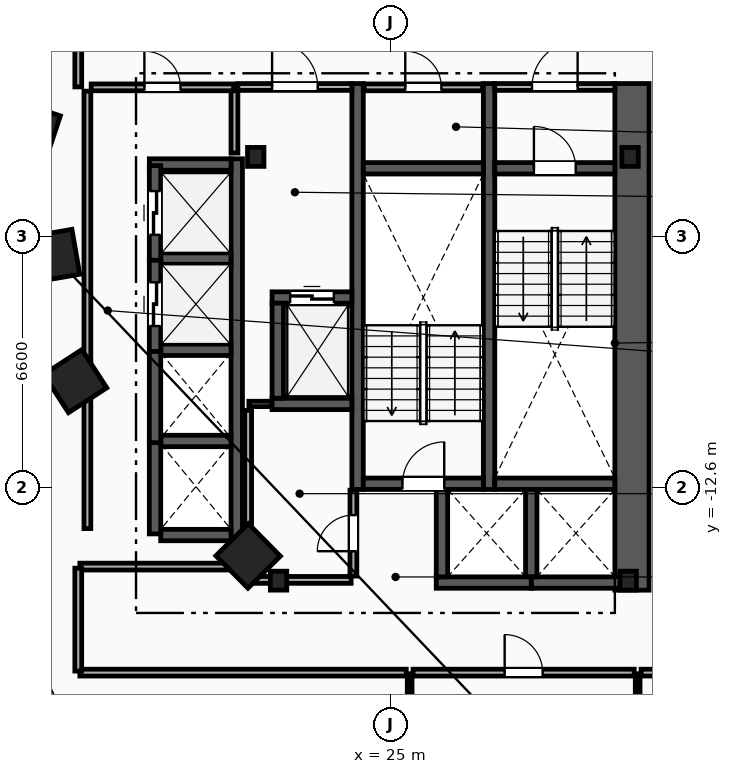
"""IFC4 building model, lengths in metres.
Left out: names, types, materials, properties, quantities, classifications, styles, units other than length and angle.
Written with IfcOpenShell. Run it as: python <this file> out.ifc"""

import sys

from ifc_helpers import new_model, si_unit, direction, frame, frame_2d, origin, origin_2d, place, context, subcontext, project, spatial, rectangle, i_section, extrude, element, fill, save


model = new_model("IFC4")
c1 = context("Model", 3, precision=1e-05, world=origin(), true_north=direction((0.0, 1.0)))
c2 = subcontext(c1, "Body", "Model", "MODEL_VIEW")
j1 = project(units=[si_unit("LENGTHUNIT", "METRE"), si_unit("PLANEANGLEUNIT", "RADIAN")], contexts=[c1])
p1 = place(None, origin())
s1 = spatial("IfcSite", under=j1, at=p1, CompositionType="ELEMENT")
p2 = place(p1, origin())
s2 = spatial("IfcBuilding", under=s1, at=p2, CompositionType="ELEMENT")
p3 = place(p2, frame((0.0, 0.0, 69.6)))
s3 = spatial("IfcBuildingStorey", under=s2, at=p3, CompositionType="ELEMENT", Elevation=69.6)
for number, where, z_axis, x_axis in (
    (1, (31.3, -3.9, 0.0), (0.0, 0.0, 1.0), (1.0, 0.0, 0.0)),
    (2, (21.45, -3.9, 0.0), (0.0, 0.0, 1.0), (1.0, 0.0, 0.0)),
    (3, (22.05, -15.05, 0.0), (0.0, 0.0, 1.0), (1.0, 0.0, 0.0)),
    (4, (31.25, -15.05, 0.0), (0.0, 0.0, 1.0), (1.0, 0.0, 0.0)),
):
    element("IfcColumn", number, at=place(p3, frame(where, z_axis=z_axis, x_axis=x_axis)), inside=s3, PredefinedType="COLUMN", context=c2, shape_type="SweptSolid", body=[
        extrude(i_section(OverallWidth=0.432, OverallDepth=0.498, WebThickness=0.056, FlangeThickness=0.089, FilletRadius=0.018, at=origin_2d()), origin(), (0.0, 0.0, 1.0), 3.8),
    ])
for number, where, z_axis, x_axis in (
    (5, (15.55, -3.2, 0.0), (0.0, 0.0, 1.0), (-0.315, -0.949, 0.0)),
    (6, (16.125, -6.5, 0.0), (0.0, 0.0, 1.0), (0.172, -0.985, 0.0)),
    (7, (16.7, -9.8, 0.0), (0.0, 0.0, 1.0), (0.544, -0.839, 0.0)),
    (8, (21.25, -14.4, 0.0), (0.0, 0.0, 1.0), (0.703, -0.711, 0.0)),
):
    element("IfcColumn", number, at=place(p3, frame(where, z_axis=z_axis, x_axis=x_axis)), inside=s3, PredefinedType="COLUMN", context=c2, shape_type="SweptSolid", body=[
        extrude(rectangle(XDim=1.2, YDim=1.2, at=origin_2d()), origin(), (0.0, 0.0, 1.0), 3.8),
    ])
p4 = place(p3, frame((31.35, -15.3, 0.0), z_axis=(0.0, 0.0, 1.0), x_axis=(0.0, 1.0, 0.0)))
e9 = element("IfcWall", 9, at=p4, inside=s3, PredefinedType="SHEAR", context=c2, shape_type="SweptSolid", body=[
    extrude(rectangle(XDim=13.33, YDim=0.9, at=frame_2d((6.665, 0.0))), origin(), (0.0, 0.0, 1.0), 3.5),
])
for number, where, z_axis, x_axis in (
    (10, (27.59, -12.65, 0.0), (0.0, 0.0, 1.0), (0.0, 1.0, 0.0)),
    (11, (24.13, -12.65, 0.0), (0.0, 0.0, 1.0), (0.0, 1.0, 0.0)),
):
    element("IfcWall", number, at=place(p3, frame(where, z_axis=z_axis, x_axis=x_axis)), inside=s3, PredefinedType="SHEAR", context=c2, shape_type="SweptSolid", body=[
        extrude(rectangle(XDim=10.68, YDim=0.3, at=frame_2d((5.34, 0.0))), origin(), (0.0, 0.0, 1.0), 3.5),
    ])
p5 = place(p3, frame((27.74, -4.2, 0.0), z_axis=(0.0, 0.0, 1.0), x_axis=(1.0, 0.0, 0.0)))
e12 = element("IfcWall", 12, at=p5, inside=s3, PredefinedType="SHEAR", context=c2, shape_type="SweptSolid", body=[
    extrude(rectangle(XDim=3.16, YDim=0.3, at=frame_2d((1.58, 0.0))), origin(), (0.0, 0.0, 1.0), 3.5),
])
p6 = place(p5, frame((1.03, 0.0, 0.0)))
e13 = element("IfcOpeningElement", 13, at=p6, cuts=e12, PredefinedType="OPENING", context=c2, shape_type="SweptSolid", body=[
    extrude(rectangle(XDim=1.1, YDim=2.15, at=frame_2d((0.55, 1.075))), frame((0.0, 0.16, 0.0), z_axis=(0.0, -1.0, 0.0), x_axis=(1.0, 0.0, 0.0)), (0.0, 0.0, 1.0), 0.32),
])
p7 = place(p3, frame((27.74, -12.5, 0.0), z_axis=(0.0, 0.0, 1.0), x_axis=(1.0, 0.0, 0.0)))
e14 = element("IfcWall", 14, at=p7, inside=s3, PredefinedType="SHEAR", context=c2, shape_type="SweptSolid", body=[
    extrude(rectangle(XDim=3.16, YDim=0.3, at=frame_2d((1.58, 0.0))), origin(), (0.0, 0.0, 1.0), 3.5),
])
p8 = place(p3, frame((24.28, -12.5, 0.0), z_axis=(0.0, 0.0, 1.0), x_axis=(1.0, 0.0, 0.0)))
e15 = element("IfcWall", 15, at=p8, inside=s3, PredefinedType="SHEAR", context=c2, shape_type="SweptSolid", body=[
    extrude(rectangle(XDim=3.16, YDim=0.3, at=frame_2d((1.58, 0.0))), origin(), (0.0, 0.0, 1.0), 3.5),
])
p9 = place(p8, frame((1.03, 0.0, 0.0)))
e16 = element("IfcOpeningElement", 16, at=p9, cuts=e15, PredefinedType="OPENING", context=c2, shape_type="SweptSolid", body=[
    extrude(rectangle(XDim=1.1, YDim=2.15, at=frame_2d((0.55, 1.075))), frame((0.0, 0.16, 0.0), z_axis=(0.0, -1.0, 0.0), x_axis=(1.0, 0.0, 0.0)), (0.0, 0.0, 1.0), 0.32),
])
p10 = place(p3, frame((24.28, -4.2, 0.0), z_axis=(0.0, 0.0, 1.0), x_axis=(1.0, 0.0, 0.0)))
e17 = element("IfcWall", 17, at=p10, inside=s3, PredefinedType="SHEAR", context=c2, shape_type="SweptSolid", body=[
    extrude(rectangle(XDim=3.16, YDim=0.3, at=frame_2d((1.58, 0.0))), origin(), (0.0, 0.0, 1.0), 3.5),
])
p11 = place(p3, frame((20.89, -3.8, 0.0), z_axis=(0.0, 0.0, 1.0), x_axis=(0.0, 1.0, 0.0)))
e18 = element("IfcWall", 18, at=p11, inside=s3, PredefinedType="PARTITIONING", context=c2, shape_type="SweptSolid", body=[
    extrude(rectangle(XDim=1.65, YDim=0.18, at=frame_2d((0.825, 0.0))), origin(), (0.0, 0.0, 1.0), 3.5),
])
p12 = place(p3, frame((20.98, -2.06, 0.0), z_axis=(0.0, 0.0, 1.0), x_axis=(1.0, 0.0, 0.0)))
e19 = element("IfcWall", 19, at=p12, inside=s3, PredefinedType="PARTITIONING", context=c2, shape_type="SweptSolid", body=[
    extrude(rectangle(XDim=3.0, YDim=0.18, at=frame_2d((1.5, 0.0))), origin(), (0.0, 0.0, 1.0), 3.5),
])
p13 = place(p12, frame((0.9, 0.0, 0.0)))
e20 = element("IfcOpeningElement", 20, at=p13, cuts=e19, PredefinedType="OPENING", context=c2, shape_type="SweptSolid", body=[
    extrude(rectangle(XDim=1.2, YDim=2.15, at=frame_2d((0.6, 1.075))), frame((0.0, 0.1, 0.0), z_axis=(0.0, -1.0, 0.0), x_axis=(1.0, 0.0, 0.0)), (0.0, 0.0, 1.0), 0.2),
])
p14 = place(p3, frame((27.74, -2.06, 0.0), z_axis=(0.0, 0.0, 1.0), x_axis=(1.0, 0.0, 0.0)))
e21 = element("IfcWall", 21, at=p14, inside=s3, PredefinedType="PARTITIONING", context=c2, shape_type="SweptSolid", body=[
    extrude(rectangle(XDim=3.16, YDim=0.18, at=frame_2d((1.58, 0.0))), origin(), (0.0, 0.0, 1.0), 3.5),
])
p15 = place(p14, frame((0.98, 0.0, 0.0)))
e22 = element("IfcOpeningElement", 22, at=p15, cuts=e21, PredefinedType="OPENING", context=c2, shape_type="SweptSolid", body=[
    extrude(rectangle(XDim=1.2, YDim=2.15, at=frame_2d((0.6, 1.075))), frame((0.0, 0.1, 0.0), z_axis=(0.0, -1.0, 0.0), x_axis=(1.0, 0.0, 0.0)), (0.0, 0.0, 1.0), 0.2),
])
p16 = place(p3, frame((21.88, -7.6, 0.0), z_axis=(0.0, 0.0, 1.0), x_axis=(1.0, 0.0, 0.0)))
e23 = element("IfcWall", 23, at=p16, inside=s3, PredefinedType="SHEAR", context=c2, shape_type="SweptSolid", body=[
    extrude(rectangle(XDim=2.1, YDim=0.3, at=frame_2d((1.05, 0.0))), origin(), (0.0, 0.0, 1.0), 3.5),
])
p17 = place(p16, frame((0.475, 0.0, 0.0)))
e24 = element("IfcOpeningElement", 24, at=p17, cuts=e23, PredefinedType="OPENING", context=c2, shape_type="SweptSolid", body=[
    extrude(rectangle(XDim=1.15, YDim=2.2, at=frame_2d((0.575, 1.1))), frame((0.0, 0.16, 0.0), z_axis=(0.0, -1.0, 0.0), x_axis=(1.0, 0.0, 0.0)), (0.0, 0.0, 1.0), 0.32),
])
p18 = place(p3, frame((21.88, -10.4, 0.0), z_axis=(0.0, 0.0, 1.0), x_axis=(1.0, 0.0, 0.0)))
e25 = element("IfcWall", 25, at=p18, inside=s3, PredefinedType="SHEAR", context=c2, shape_type="SweptSolid", body=[
    extrude(rectangle(XDim=2.1, YDim=0.3, at=frame_2d((1.05, 0.0))), origin(), (0.0, 0.0, 1.0), 3.5),
])
for number, where, z_axis, x_axis in (
    (26, (22.03, -10.25, 0.0), (0.0, 0.0, 1.0), (0.0, 1.0, 0.0)),
    (27, (28.7, -15.1, 0.0), (0.0, 0.0, 1.0), (1.0, 0.0, 0.0)),
):
    element("IfcWall", number, at=place(p3, frame(where, z_axis=z_axis, x_axis=x_axis)), inside=s3, PredefinedType="SHEAR", context=c2, shape_type="SweptSolid", body=[
        extrude(rectangle(XDim=2.5, YDim=0.3, at=frame_2d((1.25, 0.0))), origin(), (0.0, 0.0, 1.0), 3.5),
    ])
p19 = place(p3, frame((28.7, -14.95, 0.0), z_axis=(0.0, 0.0, 1.0), x_axis=(0.0, 1.0, 0.0)))
e28 = element("IfcWall", 28, at=p19, inside=s3, PredefinedType="SHEAR", context=c2, shape_type="SweptSolid", body=[
    extrude(rectangle(XDim=2.3, YDim=0.3, at=frame_2d((1.15, 0.0))), origin(), (0.0, 0.0, 1.0), 3.5),
])
p20 = place(p3, frame((26.2, -15.1, 0.0), z_axis=(0.0, 0.0, 1.0), x_axis=(1.0, 0.0, 0.0)))
e29 = element("IfcWall", 29, at=p20, inside=s3, PredefinedType="SHEAR", context=c2, shape_type="SweptSolid", body=[
    extrude(rectangle(XDim=2.5, YDim=0.3, at=frame_2d((1.25, 0.0))), origin(), (0.0, 0.0, 1.0), 3.5),
])
p21 = place(p3, frame((26.35, -14.95, 0.0), z_axis=(0.0, 0.0, 1.0), x_axis=(0.0, 1.0, 0.0)))
e30 = element("IfcWall", 30, at=p21, inside=s3, PredefinedType="SHEAR", context=c2, shape_type="SweptSolid", body=[
    extrude(rectangle(XDim=2.3, YDim=0.3, at=frame_2d((1.15, 0.0))), origin(), (0.0, 0.0, 1.0), 3.5),
])
p22 = place(p3, frame((20.95, -14.0, 0.0), z_axis=(0.0, 0.0, 1.0), x_axis=(0.0, 1.0, 0.0)))
e31 = element("IfcWall", 31, at=p22, inside=s3, PredefinedType="SHEAR", context=c2, shape_type="SweptSolid", body=[
    extrude(rectangle(XDim=10.05, YDim=0.3, at=frame_2d((5.025, 0.0))), origin(), (0.0, 0.0, 1.0), 3.5),
])
p23 = place(p3, frame((18.95, -13.85, 0.0), z_axis=(0.0, 0.0, 1.0), x_axis=(1.0, 0.0, 0.0)))
e32 = element("IfcWall", 32, at=p23, inside=s3, PredefinedType="SHEAR", context=c2, shape_type="SweptSolid", body=[
    extrude(rectangle(XDim=1.85, YDim=0.3, at=frame_2d((0.925, 0.0))), origin(), (0.0, 0.0, 1.0), 3.5),
])
p24 = place(p3, frame((18.65, -4.1, 0.0), z_axis=(0.0, 0.0, 1.0), x_axis=(1.0, 0.0, 0.0)))
e33 = element("IfcWall", 33, at=p24, inside=s3, PredefinedType="SHEAR", context=c2, shape_type="SweptSolid", body=[
    extrude(rectangle(XDim=2.15, YDim=0.3, at=frame_2d((1.075, 0.0))), origin(), (0.0, 0.0, 1.0), 3.5),
])
for number, where, z_axis, x_axis in (
    (34, (18.95, -11.375, 0.0), (0.0, 0.0, 1.0), (1.0, 0.0, 0.0)),
    (35, (18.95, -8.975, 0.0), (0.0, 0.0, 1.0), (1.0, 0.0, 0.0)),
    (36, (18.95, -6.575, 0.0), (0.0, 0.0, 1.0), (1.0, 0.0, 0.0)),
):
    element("IfcWall", number, at=place(p3, frame(where, z_axis=z_axis, x_axis=x_axis)), inside=s3, PredefinedType="SHEAR", context=c2, shape_type="SweptSolid", body=[
        extrude(rectangle(XDim=1.85, YDim=0.3, at=frame_2d((0.925, 0.0))), origin(), (0.0, 0.0, 1.0), 3.5),
    ])
for number, where, z_axis, x_axis in (
    (37, (18.8, -13.82, 0.0), (0.0, 0.0, 1.0), (0.0, 1.0, 0.0)),
    (38, (18.8, -11.42, 0.0), (0.0, 0.0, 1.0), (0.0, 1.0, 0.0)),
):
    element("IfcWall", number, at=place(p3, frame(where, z_axis=z_axis, x_axis=x_axis)), inside=s3, PredefinedType="SHEAR", context=c2, shape_type="SweptSolid", body=[
        extrude(rectangle(XDim=2.49, YDim=0.3, at=frame_2d((1.245, 0.0))), origin(), (0.0, 0.0, 1.0), 3.5),
    ])
p25 = place(p3, frame((18.8, -9.02, 0.0), z_axis=(0.0, 0.0, 1.0), x_axis=(0.0, 1.0, 0.0)))
e39 = element("IfcWall", 39, at=p25, inside=s3, PredefinedType="SHEAR", context=c2, shape_type="SweptSolid", body=[
    extrude(rectangle(XDim=2.49, YDim=0.3, at=frame_2d((1.245, 0.0))), origin(), (0.0, 0.0, 1.0), 3.5),
])
p26 = place(p25, frame((0.67, 0.0, 0.0)))
e40 = element("IfcOpeningElement", 40, at=p26, cuts=e39, PredefinedType="OPENING", context=c2, shape_type="SweptSolid", body=[
    extrude(rectangle(XDim=1.15, YDim=2.2, at=frame_2d((0.575, 1.1))), frame((0.0, 0.16, 0.0), z_axis=(0.0, -1.0, 0.0), x_axis=(1.0, 0.0, 0.0)), (0.0, 0.0, 1.0), 0.32),
])
p27 = place(p3, frame((18.8, -6.62, 0.0), z_axis=(0.0, 0.0, 1.0), x_axis=(0.0, 1.0, 0.0)))
e41 = element("IfcWall", 41, at=p27, inside=s3, PredefinedType="SHEAR", context=c2, shape_type="SweptSolid", body=[
    extrude(rectangle(XDim=2.49, YDim=0.3, at=frame_2d((1.245, 0.0))), origin(), (0.0, 0.0, 1.0), 3.5),
])
p28 = place(p27, frame((0.67, 0.0, 0.0)))
e42 = element("IfcOpeningElement", 42, at=p28, cuts=e41, PredefinedType="OPENING", context=c2, shape_type="SweptSolid", body=[
    extrude(rectangle(XDim=1.15, YDim=2.2, at=frame_2d((0.575, 1.1))), frame((0.0, 0.16, 0.0), z_axis=(0.0, -1.0, 0.0), x_axis=(1.0, 0.0, 0.0)), (0.0, 0.0, 1.0), 0.32),
])
p29 = place(p3, frame((17.02, -13.68, 0.0), z_axis=(0.0, 0.0, 1.0), x_axis=(0.0, 1.0, 0.0)))
e43 = element("IfcWall", 43, at=p29, inside=s3, PredefinedType="PARTITIONING", context=c2, shape_type="SweptSolid", body=[
    extrude(rectangle(XDim=11.51, YDim=0.18, at=frame_2d((5.755, 0.0))), origin(), (0.0, 0.0, 1.0), 3.5),
])
p30 = place(p3, frame((17.12, -2.07, 0.0), z_axis=(0.0, 0.0, 1.0), x_axis=(1.0, 0.0, 0.0)))
e44 = element("IfcWall", 44, at=p30, inside=s3, PredefinedType="PARTITIONING", context=c2, shape_type="SweptSolid", body=[
    extrude(rectangle(XDim=3.75, YDim=0.18, at=frame_2d((1.875, 0.0))), origin(), (0.0, 0.0, 1.0), 3.5),
])
p31 = place(p30, frame((1.4, 0.0, 0.0)))
e45 = element("IfcOpeningElement", 45, at=p31, cuts=e44, PredefinedType="OPENING", context=c2, shape_type="SweptSolid", body=[
    extrude(rectangle(XDim=0.95, YDim=2.1, at=frame_2d((0.475, 1.05))), frame((0.0, 0.1, 0.0), z_axis=(0.0, -1.0, 0.0), x_axis=(1.0, 0.0, 0.0)), (0.0, 0.0, 1.0), 0.2),
])
p32 = place(p3, frame((21.27, -10.4, 0.0), z_axis=(0.0, 0.0, 1.0), x_axis=(1.0, 0.0, 0.0)))
e46 = element("IfcWall", 46, at=p32, inside=s3, PredefinedType="PARTITIONING", context=c2, shape_type="SweptSolid", body=[
    extrude(rectangle(XDim=0.59, YDim=0.14, at=frame_2d((0.295, 0.0))), origin(), (0.0, 0.0, 1.0), 3.5),
])
p33 = place(p3, frame((21.25, -14.93, 0.0), z_axis=(0.0, 0.0, 1.0), x_axis=(0.0, 1.0, 0.0)))
e47 = element("IfcWall", 47, at=p33, inside=s3, PredefinedType="PARTITIONING", context=c2, shape_type="SweptSolid", body=[
    extrude(rectangle(XDim=4.36, YDim=0.18, at=frame_2d((2.18, 0.0))), origin(), (0.0, 0.0, 1.0), 3.5),
])
p34 = place(p3, frame((21.35, -15.03, 0.0), z_axis=(0.0, 0.0, 1.0), x_axis=(1.0, 0.0, 0.0)))
e48 = element("IfcWall", 48, at=p34, inside=s3, PredefinedType="PARTITIONING", context=c2, shape_type="SweptSolid", body=[
    extrude(rectangle(XDim=2.61, YDim=0.18, at=frame_2d((1.305, 0.0))), origin(), (0.0, 0.0, 1.0), 2.573),
])
p35 = place(p3, frame((24.3, -2.07, 0.0), z_axis=(0.0, 0.0, 1.0), x_axis=(1.0, 0.0, 0.0)))
e49 = element("IfcWall", 49, at=p35, inside=s3, PredefinedType="PARTITIONING", context=c2, shape_type="SweptSolid", body=[
    extrude(rectangle(XDim=3.12, YDim=0.18, at=frame_2d((1.56, 0.0))), origin(), (0.0, 0.0, 1.0), 3.5),
])
p36 = place(p35, frame((1.085, 0.0, 0.0)))
e50 = element("IfcOpeningElement", 50, at=p36, cuts=e49, PredefinedType="OPENING", context=c2, shape_type="SweptSolid", body=[
    extrude(rectangle(XDim=0.95, YDim=2.1, at=frame_2d((0.475, 1.05))), frame((0.0, 0.1, 0.0), z_axis=(0.0, -1.0, 0.0), x_axis=(1.0, 0.0, 0.0)), (0.0, 0.0, 1.0), 0.2),
])
p37 = place(p3, frame((24.02, -14.93, 0.0), z_axis=(0.0, 0.0, 1.0), x_axis=(0.0, 1.0, 0.0)))
e51 = element("IfcWall", 51, at=p37, inside=s3, PredefinedType="PARTITIONING", context=c2, shape_type="SweptSolid", body=[
    extrude(rectangle(XDim=2.26, YDim=0.18, at=frame_2d((1.13, 0.0))), origin(), (0.0, 0.0, 1.0), 3.5),
])
p38 = place(p37, frame((0.655, 0.0, 0.0)))
e52 = element("IfcOpeningElement", 52, at=p38, cuts=e51, PredefinedType="OPENING", context=c2, shape_type="SweptSolid", body=[
    extrude(rectangle(XDim=0.95, YDim=2.1, at=frame_2d((0.475, 1.05))), frame((0.0, 0.1, 0.0), z_axis=(0.0, -1.0, 0.0), x_axis=(1.0, 0.0, 0.0)), (0.0, 0.0, 1.0), 0.2),
])
p39 = place(p3, frame((25.5, -25.025, 0.0), z_axis=(0.0, 0.0, 1.0), x_axis=(0.0, 1.0, 0.0)))
e53 = element("IfcWall", 53, at=p39, inside=s3, PredefinedType="PARTITIONING", context=c2, shape_type="SweptSolid", body=[
    extrude(rectangle(XDim=7.525, YDim=0.125, at=frame_2d((3.762, 0.0))), origin(), (0.0, 0.0, 1.0), 3.5),
])
p40 = place(p3, frame((31.5, -25.985, 0.0), z_axis=(0.0, 0.0, 1.0), x_axis=(0.0, 1.0, 0.0)))
e54 = element("IfcWall", 54, at=p40, inside=s3, PredefinedType="PARTITIONING", context=c2, shape_type="SweptSolid", body=[
    extrude(rectangle(XDim=8.485, YDim=0.125, at=frame_2d((4.243, 0.0))), origin(), (0.0, 0.0, 1.0), 3.5),
])
p41 = place(p3, frame((25.59, -17.47, 0.0), z_axis=(0.0, 0.0, 1.0), x_axis=(1.0, 0.0, 0.0)))
e55 = element("IfcWall", 55, at=p41, inside=s3, PredefinedType="PARTITIONING", context=c2, shape_type="SweptSolid", body=[
    extrude(rectangle(XDim=5.82, YDim=0.18, at=frame_2d((2.91, 0.0))), origin(), (0.0, 0.0, 1.0), 3.5),
])
p42 = place(p41, frame((2.41, 0.0, 0.0)))
e56 = element("IfcOpeningElement", 56, at=p42, cuts=e55, PredefinedType="OPENING", context=c2, shape_type="SweptSolid", body=[
    extrude(rectangle(XDim=1.0, YDim=2.15, at=frame_2d((0.5, 1.075))), frame((0.0, 0.1, 0.0), z_axis=(0.0, -1.0, 0.0), x_axis=(1.0, 0.0, 0.0)), (0.0, 0.0, 1.0), 0.2),
])
p43 = place(p3, frame((16.822, -17.47, 0.0), z_axis=(0.0, 0.0, 1.0), x_axis=(1.0, 0.0, 0.0)))
e57 = element("IfcWall", 57, at=p43, inside=s3, PredefinedType="PARTITIONING", context=c2, shape_type="SweptSolid", body=[
    extrude(rectangle(XDim=8.588, YDim=0.18, at=frame_2d((4.294, 0.0))), origin(), (0.0, 0.0, 1.0), 3.5),
])
p44 = place(p3, frame((21.178, -14.68, 0.0), z_axis=(0.0, 0.0, 1.0), x_axis=(-1.0, 0.0, 0.0)))
e58 = element("IfcWall", 58, at=p44, inside=s3, PredefinedType="PARTITIONING", context=c2, shape_type="SweptSolid", body=[
    extrude(rectangle(XDim=4.357, YDim=0.18, at=frame_2d((2.178, 0.0))), origin(), (0.0, 0.0, 1.0), 3.5),
])
p45 = place(p3, frame((16.78, -14.721, 0.0), z_axis=(0.0, 0.0, 1.0), x_axis=(0.0, -1.0, 0.0)))
e59 = element("IfcWall", 59, at=p45, inside=s3, PredefinedType="PARTITIONING", context=c2, shape_type="SweptSolid", body=[
    extrude(rectangle(XDim=2.707, YDim=0.18, at=frame_2d((1.354, 0.0))), origin(), (0.0, 0.0, 1.0), 3.5),
])
p46 = place(p3, frame((16.78, 0.329, 0.0), z_axis=(0.0, 0.0, 1.0), x_axis=(0.0, -1.0, 0.0)))
e60 = element("IfcWall", 60, at=p46, inside=s3, PredefinedType="PARTITIONING", context=c2, shape_type="SweptSolid", body=[
    extrude(rectangle(XDim=2.387, YDim=0.18, at=frame_2d((1.194, 0.0))), origin(), (0.0, 0.0, 1.0), 3.5),
])
p47 = place(p3, frame((31.59, -17.47, 0.0), z_axis=(0.0, 0.0, 1.0), x_axis=(1.0, 0.0, 0.0)))
e61 = element("IfcWall", 61, at=p47, inside=s3, PredefinedType="PARTITIONING", context=c2, shape_type="SweptSolid", body=[
    extrude(rectangle(XDim=2.038, YDim=0.18, at=frame_2d((1.019, 0.0))), origin(), (0.0, 0.0, 1.0), 3.5),
])
p48 = place(p6, origin())
e62 = element("IfcDoor", 62, at=p48, inside=s3, OperationType="SINGLE_SWING_LEFT", PredefinedType="DOOR", context=c2, shape_type="SweptSolid", body=[
    extrude(rectangle(XDim=1.1, YDim=2.15, at=frame_2d((0.55, 1.075))), frame((0.0, 0.025, 0.0), z_axis=(0.0, -1.0, 0.0), x_axis=(1.0, 0.0, 0.0)), (0.0, 0.0, 1.0), 0.05),
])
fill(e13, e62)
p49 = place(p9, origin())
e63 = element("IfcDoor", 63, at=p49, inside=s3, OperationType="SINGLE_SWING_RIGHT", PredefinedType="DOOR", context=c2, shape_type="SweptSolid", body=[
    extrude(rectangle(XDim=1.1, YDim=2.15, at=frame_2d((0.55, 1.075))), frame((0.0, 0.025, 0.0), z_axis=(0.0, -1.0, 0.0), x_axis=(1.0, 0.0, 0.0)), (0.0, 0.0, 1.0), 0.05),
])
fill(e16, e63)
p50 = place(p13, origin())
e64 = element("IfcDoor", 64, at=p50, inside=s3, OperationType="SINGLE_SWING_LEFT", PredefinedType="DOOR", context=c2, shape_type="SweptSolid", body=[
    extrude(rectangle(XDim=1.2, YDim=2.15, at=frame_2d((0.6, 1.075))), frame((0.0, 0.025, 0.0), z_axis=(0.0, -1.0, 0.0), x_axis=(1.0, 0.0, 0.0)), (0.0, 0.0, 1.0), 0.05),
])
fill(e20, e64)
p51 = place(p15, origin())
e65 = element("IfcDoor", 65, at=p51, inside=s3, OperationType="SINGLE_SWING_RIGHT", PredefinedType="DOOR", context=c2, shape_type="SweptSolid", body=[
    extrude(rectangle(XDim=1.2, YDim=2.15, at=frame_2d((0.6, 1.075))), frame((0.0, 0.025, 0.0), z_axis=(0.0, -1.0, 0.0), x_axis=(1.0, 0.0, 0.0)), (0.0, 0.0, 1.0), 0.05),
])
fill(e22, e65)
p52 = place(p17, origin())
e66 = element("IfcDoor", 66, at=p52, inside=s3, OperationType="SLIDING_TO_LEFT", PredefinedType="TRAPDOOR", context=c2, shape_type="SweptSolid", body=[
    extrude(rectangle(XDim=1.15, YDim=2.2, at=frame_2d((0.575, 1.1))), frame((0.0, 0.025, 0.0), z_axis=(0.0, -1.0, 0.0), x_axis=(1.0, 0.0, 0.0)), (0.0, 0.0, 1.0), 0.05),
])
fill(e24, e66)
p53 = place(p26, origin())
e67 = element("IfcDoor", 67, at=p53, inside=s3, OperationType="SLIDING_TO_LEFT", PredefinedType="TRAPDOOR", context=c2, shape_type="SweptSolid", body=[
    extrude(rectangle(XDim=1.15, YDim=2.2, at=frame_2d((0.575, 1.1))), frame((0.0, 0.025, 0.0), z_axis=(0.0, -1.0, 0.0), x_axis=(1.0, 0.0, 0.0)), (0.0, 0.0, 1.0), 0.05),
])
fill(e40, e67)
p54 = place(p28, origin())
e68 = element("IfcDoor", 68, at=p54, inside=s3, OperationType="SLIDING_TO_LEFT", PredefinedType="TRAPDOOR", context=c2, shape_type="SweptSolid", body=[
    extrude(rectangle(XDim=1.15, YDim=2.2, at=frame_2d((0.575, 1.1))), frame((0.0, 0.025, 0.0), z_axis=(0.0, -1.0, 0.0), x_axis=(1.0, 0.0, 0.0)), (0.0, 0.0, 1.0), 0.05),
])
fill(e42, e68)
p55 = place(p42, origin())
e69 = element("IfcDoor", 69, at=p55, inside=s3, OperationType="SINGLE_SWING_LEFT", PredefinedType="DOOR", context=c2, shape_type="SweptSolid", body=[
    extrude(rectangle(XDim=1.0, YDim=2.15, at=frame_2d((0.5, 1.075))), frame((0.0, 0.025, 0.0), z_axis=(0.0, -1.0, 0.0), x_axis=(1.0, 0.0, 0.0)), (0.0, 0.0, 1.0), 0.05),
])
fill(e56, e69)
p56 = place(p31, origin())
e70 = element("IfcDoor", 70, at=p56, inside=s3, OperationType="SINGLE_SWING_LEFT", PredefinedType="DOOR", context=c2, shape_type="SweptSolid", body=[
    extrude(rectangle(XDim=0.95, YDim=2.1, at=frame_2d((0.475, 1.05))), frame((0.0, 0.025, 0.0), z_axis=(0.0, -1.0, 0.0), x_axis=(1.0, 0.0, 0.0)), (0.0, 0.0, 1.0), 0.05),
])
fill(e45, e70)
p57 = place(p36, origin())
e71 = element("IfcDoor", 71, at=p57, inside=s3, OperationType="SINGLE_SWING_LEFT", PredefinedType="DOOR", context=c2, shape_type="SweptSolid", body=[
    extrude(rectangle(XDim=0.95, YDim=2.1, at=frame_2d((0.475, 1.05))), frame((0.0, 0.025, 0.0), z_axis=(0.0, -1.0, 0.0), x_axis=(1.0, 0.0, 0.0)), (0.0, 0.0, 1.0), 0.05),
])
fill(e50, e71)
p58 = place(p38, origin())
e72 = element("IfcDoor", 72, at=p58, inside=s3, OperationType="SINGLE_SWING_LEFT", PredefinedType="DOOR", context=c2, shape_type="SweptSolid", body=[
    extrude(rectangle(XDim=0.95, YDim=2.1, at=frame_2d((0.475, 1.05))), frame((0.0, 0.025, 0.0), z_axis=(0.0, -1.0, 0.0), x_axis=(1.0, 0.0, 0.0)), (0.0, 0.0, 1.0), 0.05),
])
fill(e52, e72)
save(model, sys.argv[1])
